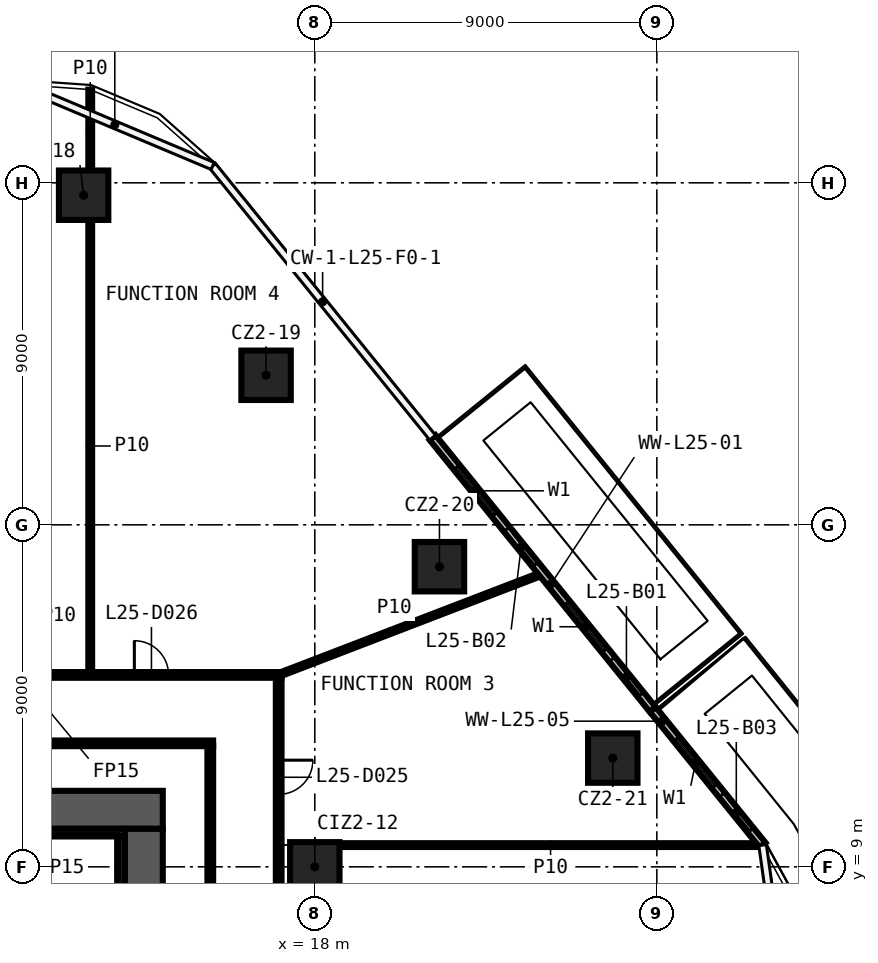
"""IFC4 building model, lengths in metres.
Left out: names, types, materials, properties, quantities, classifications, styles, units other than length and angle.
Written with IfcOpenShell. Run it as: python <this file> out.ifc"""

import sys

from ifc_helpers import new_model, si_unit, direction, frame, frame_2d, origin, origin_2d, place, context, subcontext, project, spatial, rectangle, extrude, element, fill, save


model = new_model("IFC4")
c1 = context("Model", 3, precision=1e-05, world=origin(), true_north=direction((0.0, 1.0)))
c2 = subcontext(c1, "Body", "Model", "MODEL_VIEW")
j1 = project(units=[si_unit("LENGTHUNIT", "METRE"), si_unit("PLANEANGLEUNIT", "RADIAN")], contexts=[c1])
p1 = place(None, origin())
s1 = spatial("IfcSite", under=j1, at=p1, CompositionType="ELEMENT")
p2 = place(p1, origin())
s2 = spatial("IfcBuilding", under=s1, at=p2, CompositionType="ELEMENT")
p3 = place(p2, frame((0.0, 0.0, 117.4)))
s3 = spatial("IfcBuildingStorey", under=s2, at=p3, CompositionType="ELEMENT", Elevation=117.4)
for number, where, z_axis, x_axis in (
    (1, (11.917, 26.674, 0.0), (0.0, 0.0, 1.0), (1.0, 0.0, 0.0)),
    (2, (16.718, 21.935, 0.0), (0.0, 0.0, 1.0), (1.0, 0.0, 0.0)),
    (3, (21.28, 16.898, 0.0), (0.0, 0.0, 1.0), (1.0, 0.0, 0.0)),
    (4, (25.841, 11.862, 0.0), (0.0, 0.0, 1.0), (1.0, 0.0, 0.0)),
    (5, (18.0, 9.0, 0.0), (0.0, 0.0, 1.0), (1.0, 0.0, 0.0)),
):
    element("IfcColumn", number, at=place(p3, frame(where, z_axis=z_axis, x_axis=x_axis)), inside=s3, PredefinedType="COLUMN", context=c2, shape_type="SweptSolid", body=[
        extrude(rectangle(XDim=1.3, YDim=1.3, at=origin_2d()), origin(), (0.0, 0.0, 1.0), 3.3),
    ])
p4 = place(p3, frame((18.65, 9.572, 0.0), z_axis=(0.0, 0.0, 1.0), x_axis=(1.0, 0.0, 0.0)))
e6 = element("IfcWall", 6, at=p4, inside=s3, PredefinedType="PARTITIONING", context=c2, shape_type="SweptSolid", body=[
    extrude(rectangle(XDim=11.107, YDim=0.1, at=frame_2d((5.554, 0.0))), origin(), (0.0, 0.0, 1.0), 3.3),
])
p5 = place(p3, frame((3.525, 12.25, 0.0), z_axis=(0.0, 0.0, 1.0), x_axis=(1.0, 0.0, 0.0)))
e7 = element("IfcWall", 7, at=p5, inside=s3, PredefinedType="PARTITIONING", context=c2, shape_type="SweptSolid", body=[
    extrude(rectangle(XDim=11.8, YDim=0.15, at=frame_2d((5.9, 0.0))), origin(), (0.0, 0.0, 1.0), 3.3),
])
p6 = place(p3, frame((-17.125, 14.05, 0.0), z_axis=(0.0, 0.0, 1.0), x_axis=(1.0, 0.0, 0.0)))
e8 = element("IfcWall", 8, at=p6, inside=s3, PredefinedType="PARTITIONING", context=c2, shape_type="SweptSolid", body=[
    extrude(rectangle(XDim=34.25, YDim=0.15, at=frame_2d((17.125, 0.0))), origin(), (0.0, 0.0, 1.0), 3.3),
])
p7 = place(p6, frame((30.377, 0.0, 0.0)))
e9 = element("IfcOpeningElement", 9, at=p7, cuts=e8, PredefinedType="OPENING", context=c2, shape_type="SweptSolid", body=[
    extrude(rectangle(XDim=0.9, YDim=2.1, at=frame_2d((0.45, 1.05))), frame((0.0, 0.085, 0.0), z_axis=(0.0, -1.0, 0.0), x_axis=(1.0, 0.0, 0.0)), (0.0, 0.0, 1.0), 0.17),
])
p8 = place(p6, frame((23.321, 0.0, 0.0)))
e10 = element("IfcOpeningElement", 10, at=p8, cuts=e8, PredefinedType="OPENING", context=c2, shape_type="SweptSolid", body=[
    extrude(rectangle(XDim=1.0, YDim=2.1, at=frame_2d((0.5, 1.05))), frame((0.0, 0.085, 0.0), z_axis=(0.0, -1.0, 0.0), x_axis=(1.0, 0.0, 0.0)), (0.0, 0.0, 1.0), 0.17),
])
p9 = place(p6, frame((21.183, 0.0, 0.0)))
e11 = element("IfcOpeningElement", 11, at=p9, cuts=e8, PredefinedType="OPENING", context=c2, shape_type="SweptSolid", body=[
    extrude(rectangle(XDim=1.0, YDim=2.1, at=frame_2d((0.5, 1.05))), frame((0.0, 0.085, 0.0), z_axis=(0.0, -1.0, 0.0), x_axis=(1.0, 0.0, 0.0)), (0.0, 0.0, 1.0), 0.17),
])
p10 = place(p6, frame((14.241, 0.0, 0.0)))
e12 = element("IfcOpeningElement", 12, at=p10, cuts=e8, PredefinedType="OPENING", context=c2, shape_type="SweptSolid", body=[
    extrude(rectangle(XDim=1.0, YDim=2.1, at=frame_2d((0.5, 1.05))), frame((0.0, 0.085, 0.0), z_axis=(0.0, -1.0, 0.0), x_axis=(1.0, 0.0, 0.0)), (0.0, 0.0, 1.0), 0.17),
])
p11 = place(p6, frame((12.099, 0.0, 0.0)))
e13 = element("IfcOpeningElement", 13, at=p11, cuts=e8, PredefinedType="OPENING", context=c2, shape_type="SweptSolid", body=[
    extrude(rectangle(XDim=1.0, YDim=2.1, at=frame_2d((0.5, 1.05))), frame((0.0, 0.085, 0.0), z_axis=(0.0, -1.0, 0.0), x_axis=(1.0, 0.0, 0.0)), (0.0, 0.0, 1.0), 0.17),
])
p12 = place(p6, frame((5.161, 0.0, 0.0)))
e14 = element("IfcOpeningElement", 14, at=p12, cuts=e8, PredefinedType="OPENING", context=c2, shape_type="SweptSolid", body=[
    extrude(rectangle(XDim=1.0, YDim=2.1, at=frame_2d((0.5, 1.05))), frame((0.0, 0.085, 0.0), z_axis=(0.0, -1.0, 0.0), x_axis=(1.0, 0.0, 0.0)), (0.0, 0.0, 1.0), 0.17),
])
p13 = place(p6, frame((2.406, 0.0, 0.0)))
e15 = element("IfcOpeningElement", 15, at=p13, cuts=e8, PredefinedType="OPENING", context=c2, shape_type="SweptSolid", body=[
    extrude(rectangle(XDim=0.9, YDim=2.1, at=frame_2d((0.45, 1.05))), frame((0.0, 0.085, 0.0), z_axis=(0.0, -1.0, 0.0), x_axis=(1.0, 0.0, 0.0)), (0.0, 0.0, 1.0), 0.17),
])
p14 = place(p3, frame((17.05, 14.05, 0.0), z_axis=(0.0, 0.0, 1.0), x_axis=(0.933461735893, 0.358676996228, 0.0)))
e16 = element("IfcWall", 16, at=p14, inside=s3, PredefinedType="PARTITIONING", context=c2, shape_type="SweptSolid", body=[
    extrude(rectangle(XDim=7.42, YDim=0.1, at=frame_2d((3.71, 0.0))), origin(), (0.0, 0.0, 1.0), 3.3),
])
p15 = place(p3, frame((17.05, 13.975, 0.0), z_axis=(0.0, 0.0, 1.0), x_axis=(0.0, -1.0, 0.0)))
e17 = element("IfcWall", 17, at=p15, inside=s3, PredefinedType="PARTITIONING", context=c2, shape_type="SweptSolid", body=[
    extrude(rectangle(XDim=27.95, YDim=0.15, at=frame_2d((13.975, 0.0))), origin(), (0.0, 0.0, 1.0), 3.3),
])
p16 = place(p15, frame((25.545, 0.0, 0.0)))
e18 = element("IfcOpeningElement", 18, at=p16, cuts=e17, PredefinedType="OPENING", context=c2, shape_type="SweptSolid", body=[
    extrude(rectangle(XDim=1.0, YDim=2.1, at=frame_2d((0.5, 1.05))), frame((0.0, 0.085, 0.0), z_axis=(0.0, -1.0, 0.0), x_axis=(1.0, 0.0, 0.0)), (0.0, 0.0, 1.0), 0.17),
])
p17 = place(p15, frame((19.024, 0.0, 0.0)))
e19 = element("IfcOpeningElement", 19, at=p17, cuts=e17, PredefinedType="OPENING", context=c2, shape_type="SweptSolid", body=[
    extrude(rectangle(XDim=1.0, YDim=2.1, at=frame_2d((0.5, 1.05))), frame((0.0, 0.085, 0.0), z_axis=(0.0, -1.0, 0.0), x_axis=(1.0, 0.0, 0.0)), (0.0, 0.0, 1.0), 0.17),
])
p18 = place(p15, frame((17.303, 0.0, 0.0)))
e20 = element("IfcOpeningElement", 20, at=p18, cuts=e17, PredefinedType="OPENING", context=c2, shape_type="SweptSolid", body=[
    extrude(rectangle(XDim=1.0, YDim=2.1, at=frame_2d((0.5, 1.05))), frame((0.0, 0.085, 0.0), z_axis=(0.0, -1.0, 0.0), x_axis=(1.0, 0.0, 0.0)), (0.0, 0.0, 1.0), 0.17),
])
p19 = place(p15, frame((11.155, 0.0, 0.0)))
e21 = element("IfcOpeningElement", 21, at=p19, cuts=e17, PredefinedType="OPENING", context=c2, shape_type="SweptSolid", body=[
    extrude(rectangle(XDim=0.9, YDim=2.1, at=frame_2d((0.45, 1.05))), frame((0.0, 0.085, 0.0), z_axis=(0.0, -1.0, 0.0), x_axis=(1.0, 0.0, 0.0)), (0.0, 0.0, 1.0), 0.17),
])
p20 = place(p15, frame((7.145, 0.0, 0.0)))
e22 = element("IfcOpeningElement", 22, at=p20, cuts=e17, PredefinedType="OPENING", context=c2, shape_type="SweptSolid", body=[
    extrude(rectangle(XDim=0.9, YDim=2.1, at=frame_2d((0.45, 1.05))), frame((0.0, 0.085, 0.0), z_axis=(0.0, -1.0, 0.0), x_axis=(1.0, 0.0, 0.0)), (0.0, 0.0, 1.0), 0.17),
])
p21 = place(p15, frame((2.168, 0.0, 0.0)))
e23 = element("IfcOpeningElement", 23, at=p21, cuts=e17, PredefinedType="OPENING", context=c2, shape_type="SweptSolid", body=[
    extrude(rectangle(XDim=0.9, YDim=2.1, at=frame_2d((0.45, 1.05))), frame((0.0, 0.085, 0.0), z_axis=(0.0, -1.0, 0.0), x_axis=(1.0, 0.0, 0.0)), (0.0, 0.0, 1.0), 0.17),
])
p22 = place(p3, frame((15.25, -12.175, 0.0), z_axis=(0.0, 0.0, 1.0), x_axis=(0.0, 1.0, 0.0)))
e24 = element("IfcWall", 24, at=p22, inside=s3, PredefinedType="PARTITIONING", context=c2, shape_type="SweptSolid", body=[
    extrude(rectangle(XDim=24.35, YDim=0.15, at=frame_2d((12.175, 0.0))), origin(), (0.0, 0.0, 1.0), 3.3),
])
p23 = place(p22, frame((11.725, 0.0, 0.0)))
e25 = element("IfcOpeningElement", 25, at=p23, cuts=e24, PredefinedType="OPENING", context=c2, shape_type="SweptSolid", body=[
    extrude(rectangle(XDim=0.9, YDim=2.1, at=frame_2d((0.45, 1.05))), frame((0.0, 0.085, 0.0), z_axis=(0.0, -1.0, 0.0), x_axis=(1.0, 0.0, 0.0)), (0.0, 0.0, 1.0), 0.17),
])
p24 = place(p3, frame((12.091, 14.125, 0.0), z_axis=(0.0, 0.0, 1.0), x_axis=(0.0, 1.0, 0.0)))
e26 = element("IfcWall", 26, at=p24, inside=s3, PredefinedType="PARTITIONING", context=c2, shape_type="SweptSolid", body=[
    extrude(rectangle(XDim=11.899, YDim=0.1, at=frame_2d((5.949, 0.0))), origin(), (0.0, 0.0, 1.0), 3.3),
])
p25 = place(p3, frame((12.091, 27.324, 0.0), z_axis=(0.0, 0.0, 1.0), x_axis=(0.0, 1.0, 0.0)))
e27 = element("IfcWall", 27, at=p25, inside=s3, PredefinedType="PARTITIONING", context=c2, shape_type="SweptSolid", body=[
    extrude(rectangle(XDim=2.128, YDim=0.1, at=frame_2d((1.064, 0.0))), origin(), (0.0, 0.0, 1.0), 3.3),
])
p26 = place(p3, frame((26.892, 13.142, 0.0), z_axis=(0.0, 0.0, 1.0), x_axis=(-0.629299699172, 0.777162716953, 0.0)))
e28 = element("IfcWall", 28, at=p26, inside=s3, PredefinedType="SOLIDWALL", context=c2, shape_type="SweptSolid", body=[
    extrude(rectangle(XDim=9.205, YDim=0.2, at=frame_2d((4.603, 0.0))), origin(), (0.0, 0.0, 1.0), 3.3),
])
p27 = place(p26, frame((2.0, 0.0, 0.6)))
e29 = element("IfcOpeningElement", 29, at=p27, cuts=e28, PredefinedType="OPENING", context=c2, shape_type="SweptSolid", body=[
    extrude(rectangle(XDim=1.6, YDim=2.4, at=frame_2d((0.8, 1.2))), frame((0.0, 0.11, 0.0), z_axis=(0.0, -1.0, 0.0), x_axis=(1.0, 0.0, 0.0)), (0.0, 0.0, 1.0), 0.22),
])
p28 = place(p26, frame((0.5, 0.0, 0.0)))
e30 = element("IfcOpeningElement", 30, at=p28, cuts=e28, PredefinedType="OPENING", context=c2, shape_type="SweptSolid", body=[
    extrude(rectangle(XDim=1.2, YDim=2.4, at=frame_2d((0.6, 1.2))), frame((0.0, 0.11, 0.0), z_axis=(0.0, -1.0, 0.0), x_axis=(1.0, 0.0, 0.0)), (0.0, 0.0, 1.0), 0.22),
])
p29 = place(p26, frame((6.603, 0.0, 0.6)))
e31 = element("IfcOpeningElement", 31, at=p29, cuts=e28, PredefinedType="OPENING", context=c2, shape_type="SweptSolid", body=[
    extrude(rectangle(XDim=1.6, YDim=2.4, at=frame_2d((0.8, 1.2))), frame((0.0, 0.11, 0.0), z_axis=(0.0, -1.0, 0.0), x_axis=(1.0, 0.0, 0.0)), (0.0, 0.0, 1.0), 0.22),
])
p30 = place(p26, frame((4.903, 0.0, 0.0)))
e32 = element("IfcOpeningElement", 32, at=p30, cuts=e28, PredefinedType="OPENING", context=c2, shape_type="SweptSolid", body=[
    extrude(rectangle(XDim=1.2, YDim=2.4, at=frame_2d((0.6, 1.2))), frame((0.0, 0.11, 0.0), z_axis=(0.0, -1.0, 0.0), x_axis=(1.0, 0.0, 0.0)), (0.0, 0.0, 1.0), 0.22),
])
p31 = place(p3, frame((29.783, 9.572, 0.0), z_axis=(0.0, 0.0, 1.0), x_axis=(-0.629299136059, 0.777163172928, 0.0)))
e33 = element("IfcWall", 33, at=p31, inside=s3, PredefinedType="SOLIDWALL", context=c2, shape_type="SweptSolid", body=[
    extrude(rectangle(XDim=4.594, YDim=0.2, at=frame_2d((2.297, 0.0))), origin(), (0.0, 0.0, 1.0), 3.3),
])
p32 = place(p31, frame((2.0, 0.0, 0.6)))
e34 = element("IfcOpeningElement", 34, at=p32, cuts=e33, PredefinedType="OPENING", context=c2, shape_type="SweptSolid", body=[
    extrude(rectangle(XDim=1.6, YDim=2.4, at=frame_2d((0.8, 1.2))), frame((0.0, 0.11, 0.0), z_axis=(0.0, -1.0, 0.0), x_axis=(1.0, 0.0, 0.0)), (0.0, 0.0, 1.0), 0.22),
])
p33 = place(p31, frame((0.5, 0.0, 0.0)))
e35 = element("IfcOpeningElement", 35, at=p33, cuts=e33, PredefinedType="OPENING", context=c2, shape_type="SweptSolid", body=[
    extrude(rectangle(XDim=1.2, YDim=2.4, at=frame_2d((0.6, 1.2))), frame((0.0, 0.11, 0.0), z_axis=(0.0, -1.0, 0.0), x_axis=(1.0, 0.0, 0.0)), (0.0, 0.0, 1.0), 0.22),
])
p34 = place(p3, frame((-14.0, 10.5, 0.0), z_axis=(0.0, 0.0, 1.0), x_axis=(1.0, 0.0, 0.0)))
e36 = element("IfcWall", 36, at=p34, inside=s3, PredefinedType="SHEAR", context=c2, shape_type="SweptSolid", body=[
    extrude(rectangle(XDim=28.0, YDim=1.0, at=frame_2d((14.0, 0.0))), origin(), (0.0, 0.0, 1.0), 3.3),
])
p35 = place(p34, frame((15.9, 0.0, 0.0)))
e37 = element("IfcOpeningElement", 37, at=p35, cuts=e36, PredefinedType="OPENING", context=c2, shape_type="SweptSolid", body=[
    extrude(rectangle(XDim=1.6, YDim=2.1, at=frame_2d((0.8, 1.05))), frame((0.0, 0.51, 0.0), z_axis=(0.0, -1.0, 0.0), x_axis=(1.0, 0.0, 0.0)), (0.0, 0.0, 1.0), 1.02),
])
p36 = place(p3, frame((13.5, 10.0, 0.0), z_axis=(0.0, 0.0, 1.0), x_axis=(0.0, -1.0, 0.0)))
e38 = element("IfcWall", 38, at=p36, inside=s3, PredefinedType="SHEAR", context=c2, shape_type="SweptSolid", body=[
    extrude(rectangle(XDim=20.0, YDim=1.0, at=frame_2d((10.0, 0.0))), origin(), (0.0, 0.0, 1.0), 3.3),
])
p37 = place(p3, frame((3.9, 9.9, 0.0), z_axis=(0.0, 0.0, 1.0), x_axis=(1.0, 0.0, 0.0)))
e39 = element("IfcWall", 39, at=p37, inside=s3, PredefinedType="SHEAR", context=c2, shape_type="SweptSolid", body=[
    extrude(rectangle(XDim=9.1, YDim=0.2, at=frame_2d((4.55, 0.0))), origin(), (0.0, 0.0, 1.0), 3.3),
])
p38 = place(p3, frame((12.9, 9.8, 0.0), z_axis=(0.0, 0.0, 1.0), x_axis=(0.0, -1.0, 0.0)))
e40 = element("IfcWall", 40, at=p38, inside=s3, PredefinedType="SHEAR", context=c2, shape_type="SweptSolid", body=[
    extrude(rectangle(XDim=19.6, YDim=0.2, at=frame_2d((9.8, 0.0))), origin(), (0.0, 0.0, 1.0), 3.3),
])
p39 = place(p21, origin())
e41 = element("IfcDoor", 41, at=p39, inside=s3, OperationType="SINGLE_SWING_RIGHT", PredefinedType="DOOR", context=c2, shape_type="SweptSolid", body=[
    extrude(rectangle(XDim=0.9, YDim=2.1, at=frame_2d((0.45, 1.05))), frame((0.0, 0.025, 0.0), z_axis=(0.0, -1.0, 0.0), x_axis=(1.0, 0.0, 0.0)), (0.0, 0.0, 1.0), 0.05),
])
fill(e23, e41)
p40 = place(p7, origin())
e42 = element("IfcDoor", 42, at=p40, inside=s3, OperationType="SINGLE_SWING_LEFT", PredefinedType="DOOR", context=c2, shape_type="SweptSolid", body=[
    extrude(rectangle(XDim=0.9, YDim=2.1, at=frame_2d((0.45, 1.05))), frame((0.0, 0.025, 0.0), z_axis=(0.0, -1.0, 0.0), x_axis=(1.0, 0.0, 0.0)), (0.0, 0.0, 1.0), 0.05),
])
fill(e9, e42)
p41 = place(p27, origin())
e43 = element("IfcWindow", 43, at=p41, inside=s3, PartitioningType="SINGLE_PANEL", PredefinedType="WINDOW", context=c2, shape_type="SweptSolid", body=[
    extrude(rectangle(XDim=1.6, YDim=2.4, at=frame_2d((0.8, 1.2))), frame((0.0, 0.03, 0.0), z_axis=(0.0, -1.0, 0.0), x_axis=(1.0, 0.0, 0.0)), (0.0, 0.0, 1.0), 0.06),
])
fill(e29, e43)
p42 = place(p28, origin())
e44 = element("IfcDoor", 44, at=p42, inside=s3, OperationType="SLIDING_TO_LEFT", PredefinedType="DOOR", context=c2, shape_type="SweptSolid", body=[
    extrude(rectangle(XDim=1.2, YDim=2.4, at=frame_2d((0.6, 1.2))), frame((0.0, 0.025, 0.0), z_axis=(0.0, -1.0, 0.0), x_axis=(1.0, 0.0, 0.0)), (0.0, 0.0, 1.0), 0.05),
])
fill(e30, e44)
p43 = place(p29, origin())
e45 = element("IfcWindow", 45, at=p43, inside=s3, PartitioningType="SINGLE_PANEL", PredefinedType="WINDOW", context=c2, shape_type="SweptSolid", body=[
    extrude(rectangle(XDim=1.6, YDim=2.4, at=frame_2d((0.8, 1.2))), frame((0.0, 0.03, 0.0), z_axis=(0.0, -1.0, 0.0), x_axis=(1.0, 0.0, 0.0)), (0.0, 0.0, 1.0), 0.06),
])
fill(e31, e45)
p44 = place(p30, origin())
e46 = element("IfcDoor", 46, at=p44, inside=s3, OperationType="SLIDING_TO_LEFT", PredefinedType="DOOR", context=c2, shape_type="SweptSolid", body=[
    extrude(rectangle(XDim=1.2, YDim=2.4, at=frame_2d((0.6, 1.2))), frame((0.0, 0.025, 0.0), z_axis=(0.0, -1.0, 0.0), x_axis=(1.0, 0.0, 0.0)), (0.0, 0.0, 1.0), 0.05),
])
fill(e32, e46)
p45 = place(p32, origin())
e47 = element("IfcWindow", 47, at=p45, inside=s3, PartitioningType="SINGLE_PANEL", PredefinedType="WINDOW", context=c2, shape_type="SweptSolid", body=[
    extrude(rectangle(XDim=1.6, YDim=2.4, at=frame_2d((0.8, 1.2))), frame((0.0, 0.03, 0.0), z_axis=(0.0, -1.0, 0.0), x_axis=(1.0, 0.0, 0.0)), (0.0, 0.0, 1.0), 0.06),
])
fill(e34, e47)
p46 = place(p33, origin())
e48 = element("IfcDoor", 48, at=p46, inside=s3, OperationType="SLIDING_TO_LEFT", PredefinedType="DOOR", context=c2, shape_type="SweptSolid", body=[
    extrude(rectangle(XDim=1.2, YDim=2.4, at=frame_2d((0.6, 1.2))), frame((0.0, 0.025, 0.0), z_axis=(0.0, -1.0, 0.0), x_axis=(1.0, 0.0, 0.0)), (0.0, 0.0, 1.0), 0.05),
])
fill(e35, e48)
save(model, sys.argv[1])
